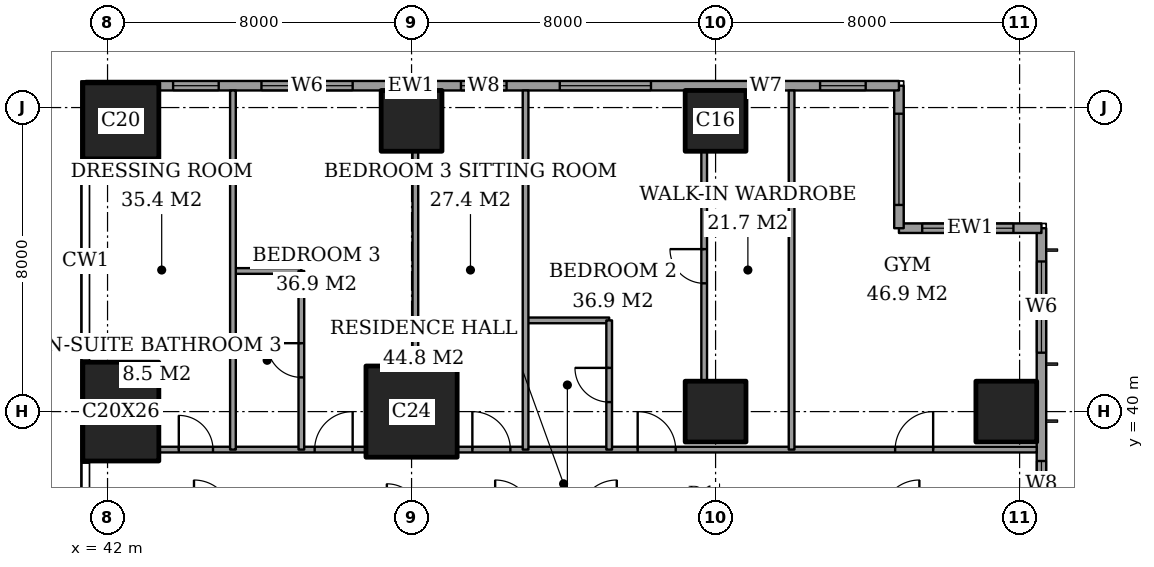
"""IFC4 building model, lengths in metres.
Left out: names, types, materials, properties, quantities, classifications, styles, units other than length and angle.
Written with IfcOpenShell. Run it as: python <this file> out.ifc"""

import sys

from ifc_helpers import new_model, si_unit, direction, frame, frame_2d, origin, origin_2d, place, context, subcontext, project, spatial, rectangle, extrude, element, fill, save


model = new_model("IFC4")
c1 = context("Model", 3, precision=1e-05, world=origin(), true_north=direction((0.0, 1.0)))
c2 = subcontext(c1, "Body", "Model", "MODEL_VIEW")
j1 = project(units=[si_unit("LENGTHUNIT", "METRE"), si_unit("PLANEANGLEUNIT", "RADIAN")], contexts=[c1])
p1 = place(None, origin())
s1 = spatial("IfcSite", under=j1, at=p1, CompositionType="ELEMENT")
p2 = place(p1, origin())
s2 = spatial("IfcBuilding", under=s1, at=p2, CompositionType="ELEMENT")
p3 = place(p2, frame((0.0, 0.0, 248.4)))
s3 = spatial("IfcBuildingStorey", under=s2, at=p3, CompositionType="ELEMENT", Elevation=248.4)
p4 = place(p3, frame((42.35, 40.0, 0.0), z_axis=(0.0, 0.0, 1.0), x_axis=(1.0, 0.0, 0.0)))
e1 = element("IfcColumn", 1, at=p4, inside=s3, PredefinedType="COLUMN", context=c2, shape_type="SweptSolid", body=[
    extrude(rectangle(XDim=2.0, YDim=2.6, at=origin_2d()), origin(), (0.0, 0.0, 1.0), 3.6),
])
p5 = place(p3, frame((42.35, 47.65, 0.0), z_axis=(0.0, 0.0, 1.0), x_axis=(1.0, 0.0, 0.0)))
e2 = element("IfcColumn", 2, at=p5, inside=s3, PredefinedType="COLUMN", context=c2, shape_type="SweptSolid", body=[
    extrude(rectangle(XDim=2.0, YDim=2.0, at=origin_2d()), origin(), (0.0, 0.0, 1.0), 3.6),
])
p6 = place(p3, frame((50.0, 40.0, 0.0), z_axis=(0.0, 0.0, 1.0), x_axis=(1.0, 0.0, 0.0)))
e3 = element("IfcColumn", 3, at=p6, inside=s3, PredefinedType="COLUMN", context=c2, shape_type="SweptSolid", body=[
    extrude(rectangle(XDim=2.4, YDim=2.4, at=origin_2d()), origin(), (0.0, 0.0, 1.0), 3.6),
])
for number, where, z_axis, x_axis in (
    (4, (50.0, 47.65, 0.0), (0.0, 0.0, 1.0), (1.0, 0.0, 0.0)),
    (5, (58.0, 40.0, 0.0), (0.0, 0.0, 1.0), (1.0, 0.0, 0.0)),
    (6, (58.0, 47.65, 0.0), (0.0, 0.0, 1.0), (1.0, 0.0, 0.0)),
    (7, (65.65, 40.0, 0.0), (0.0, 0.0, 1.0), (1.0, 0.0, 0.0)),
):
    element("IfcColumn", number, at=place(p3, frame(where, z_axis=z_axis, x_axis=x_axis)), inside=s3, PredefinedType="COLUMN", context=c2, shape_type="SweptSolid", body=[
        extrude(rectangle(XDim=1.6, YDim=1.6, at=origin_2d()), origin(), (0.0, 0.0, 1.0), 3.6),
    ])
p7 = place(p3, frame((66.575, 3.175, 0.0), z_axis=(0.0, 0.0, 1.0), x_axis=(0.0, 1.0, 0.0)))
e8 = element("IfcWall", 8, at=p7, inside=s3, PredefinedType="SOLIDWALL", context=c2, shape_type="SweptSolid", body=[
    extrude(rectangle(XDim=41.65, YDim=0.25, at=frame_2d((20.825, 0.0))), origin(), (0.0, 0.0, 1.0), 3.6),
])
p8 = place(p7, frame((0.875, 0.0, 0.6)))
e9 = element("IfcOpeningElement", 9, at=p8, cuts=e8, PredefinedType="OPENING", context=c2, shape_type="SweptSolid", body=[
    extrude(rectangle(XDim=2.4, YDim=2.0, at=frame_2d((1.2, 1.0))), frame((0.0, 0.135, 0.0), z_axis=(0.0, -1.0, 0.0), x_axis=(1.0, 0.0, 0.0)), (0.0, 0.0, 1.0), 0.27),
])
p9 = place(p7, frame((6.0, 0.0, 0.6)))
e10 = element("IfcOpeningElement", 10, at=p9, cuts=e8, PredefinedType="OPENING", context=c2, shape_type="SweptSolid", body=[
    extrude(rectangle(XDim=1.2, YDim=2.0, at=frame_2d((0.6, 1.0))), frame((0.0, 0.135, 0.0), z_axis=(0.0, -1.0, 0.0), x_axis=(1.0, 0.0, 0.0)), (0.0, 0.0, 1.0), 0.27),
])
p10 = place(p7, frame((8.525, 0.0, 0.6)))
e11 = element("IfcOpeningElement", 11, at=p10, cuts=e8, PredefinedType="OPENING", context=c2, shape_type="SweptSolid", body=[
    extrude(rectangle(XDim=2.4, YDim=2.0, at=frame_2d((1.2, 1.0))), frame((0.0, 0.135, 0.0), z_axis=(0.0, -1.0, 0.0), x_axis=(1.0, 0.0, 0.0)), (0.0, 0.0, 1.0), 0.27),
])
p11 = place(p7, frame((15.725, 0.0, 0.6)))
e12 = element("IfcOpeningElement", 12, at=p11, cuts=e8, PredefinedType="OPENING", context=c2, shape_type="SweptSolid", body=[
    extrude(rectangle(XDim=2.4, YDim=2.0, at=frame_2d((1.2, 1.0))), frame((0.0, 0.135, 0.0), z_axis=(0.0, -1.0, 0.0), x_axis=(1.0, 0.0, 0.0)), (0.0, 0.0, 1.0), 0.27),
])
p12 = place(p7, frame((23.525, 0.0, 0.6)))
e13 = element("IfcOpeningElement", 13, at=p12, cuts=e8, PredefinedType="OPENING", context=c2, shape_type="SweptSolid", body=[
    extrude(rectangle(XDim=2.4, YDim=2.0, at=frame_2d((1.2, 1.0))), frame((0.0, 0.135, 0.0), z_axis=(0.0, -1.0, 0.0), x_axis=(1.0, 0.0, 0.0)), (0.0, 0.0, 1.0), 0.27),
])
p13 = place(p7, frame((30.625, 0.0, 0.6)))
e14 = element("IfcOpeningElement", 14, at=p13, cuts=e8, PredefinedType="OPENING", context=c2, shape_type="SweptSolid", body=[
    extrude(rectangle(XDim=2.4, YDim=2.0, at=frame_2d((1.2, 1.0))), frame((0.0, 0.135, 0.0), z_axis=(0.0, -1.0, 0.0), x_axis=(1.0, 0.0, 0.0)), (0.0, 0.0, 1.0), 0.27),
])
p14 = place(p7, frame((34.325, 0.0, 0.6)))
e15 = element("IfcOpeningElement", 15, at=p14, cuts=e8, PredefinedType="OPENING", context=c2, shape_type="SweptSolid", body=[
    extrude(rectangle(XDim=1.2, YDim=2.0, at=frame_2d((0.6, 1.0))), frame((0.0, 0.135, 0.0), z_axis=(0.0, -1.0, 0.0), x_axis=(1.0, 0.0, 0.0)), (0.0, 0.0, 1.0), 0.27),
])
p15 = place(p7, frame((38.375, 0.0, 0.6)))
e16 = element("IfcOpeningElement", 16, at=p15, cuts=e8, PredefinedType="OPENING", context=c2, shape_type="SweptSolid", body=[
    extrude(rectangle(XDim=2.4, YDim=2.0, at=frame_2d((1.2, 1.0))), frame((0.0, 0.135, 0.0), z_axis=(0.0, -1.0, 0.0), x_axis=(1.0, 0.0, 0.0)), (0.0, 0.0, 1.0), 0.27),
])
p16 = place(p3, frame((66.575, 44.825, 0.0), z_axis=(0.0, 0.0, 1.0), x_axis=(-1.0, 0.0, 0.0)))
e17 = element("IfcWall", 17, at=p16, inside=s3, PredefinedType="SOLIDWALL", context=c2, shape_type="SweptSolid", body=[
    extrude(rectangle(XDim=3.75, YDim=0.25, at=frame_2d((1.875, 0.0))), origin(), (0.0, 0.0, 1.0), 3.6),
])
p17 = place(p16, frame((0.738, 0.0, 0.6)))
e18 = element("IfcOpeningElement", 18, at=p17, cuts=e17, PredefinedType="OPENING", context=c2, shape_type="SweptSolid", body=[
    extrude(rectangle(XDim=2.4, YDim=2.0, at=frame_2d((1.2, 1.0))), frame((0.0, 0.135, 0.0), z_axis=(0.0, -1.0, 0.0), x_axis=(1.0, 0.0, 0.0)), (0.0, 0.0, 1.0), 0.27),
])
p18 = place(p3, frame((62.825, 44.825, 0.0), z_axis=(0.0, 0.0, 1.0), x_axis=(0.0, 1.0, 0.0)))
e19 = element("IfcWall", 19, at=p18, inside=s3, PredefinedType="SOLIDWALL", context=c2, shape_type="SweptSolid", body=[
    extrude(rectangle(XDim=3.75, YDim=0.25, at=frame_2d((1.875, 0.0))), origin(), (0.0, 0.0, 1.0), 3.6),
])
p19 = place(p18, frame((0.613, 0.0, 0.6)))
e20 = element("IfcOpeningElement", 20, at=p19, cuts=e19, PredefinedType="OPENING", context=c2, shape_type="SweptSolid", body=[
    extrude(rectangle(XDim=2.4, YDim=2.0, at=frame_2d((1.2, 1.0))), frame((0.0, 0.135, 0.0), z_axis=(0.0, -1.0, 0.0), x_axis=(1.0, 0.0, 0.0)), (0.0, 0.0, 1.0), 0.27),
])
p20 = place(p3, frame((62.825, 48.575, 0.0), z_axis=(0.0, 0.0, 1.0), x_axis=(-1.0, 0.0, 0.0)))
e21 = element("IfcWall", 21, at=p20, inside=s3, PredefinedType="SOLIDWALL", context=c2, shape_type="SweptSolid", body=[
    extrude(rectangle(XDim=21.4, YDim=0.25, at=frame_2d((10.7, 0.0))), origin(), (0.0, 0.0, 1.0), 3.6),
])
p21 = place(p20, frame((0.875, 0.0, 0.6)))
e22 = element("IfcOpeningElement", 22, at=p21, cuts=e21, PredefinedType="OPENING", context=c2, shape_type="SweptSolid", body=[
    extrude(rectangle(XDim=1.2, YDim=2.0, at=frame_2d((0.6, 1.0))), frame((0.0, 0.135, 0.0), z_axis=(0.0, -1.0, 0.0), x_axis=(1.0, 0.0, 0.0)), (0.0, 0.0, 1.0), 0.27),
])
p22 = place(p20, frame((3.2, 0.0, 0.6)))
e23 = element("IfcOpeningElement", 23, at=p22, cuts=e21, PredefinedType="OPENING", context=c2, shape_type="SweptSolid", body=[
    extrude(rectangle(XDim=0.6, YDim=2.0, at=frame_2d((0.3, 1.0))), frame((0.0, 0.135, 0.0), z_axis=(0.0, -1.0, 0.0), x_axis=(1.0, 0.0, 0.0)), (0.0, 0.0, 1.0), 0.27),
])
p23 = place(p20, frame((6.525, 0.0, 0.6)))
e24 = element("IfcOpeningElement", 24, at=p23, cuts=e21, PredefinedType="OPENING", context=c2, shape_type="SweptSolid", body=[
    extrude(rectangle(XDim=2.4, YDim=2.0, at=frame_2d((1.2, 1.0))), frame((0.0, 0.135, 0.0), z_axis=(0.0, -1.0, 0.0), x_axis=(1.0, 0.0, 0.0)), (0.0, 0.0, 1.0), 0.27),
])
p24 = place(p20, frame((10.325, 0.0, 0.6)))
e25 = element("IfcOpeningElement", 25, at=p24, cuts=e21, PredefinedType="OPENING", context=c2, shape_type="SweptSolid", body=[
    extrude(rectangle(XDim=1.2, YDim=2.0, at=frame_2d((0.6, 1.0))), frame((0.0, 0.135, 0.0), z_axis=(0.0, -1.0, 0.0), x_axis=(1.0, 0.0, 0.0)), (0.0, 0.0, 1.0), 0.27),
])
p25 = place(p20, frame((14.375, 0.0, 0.6)))
e26 = element("IfcOpeningElement", 26, at=p25, cuts=e21, PredefinedType="OPENING", context=c2, shape_type="SweptSolid", body=[
    extrude(rectangle(XDim=2.4, YDim=2.0, at=frame_2d((1.2, 1.0))), frame((0.0, 0.135, 0.0), z_axis=(0.0, -1.0, 0.0), x_axis=(1.0, 0.0, 0.0)), (0.0, 0.0, 1.0), 0.27),
])
p26 = place(p20, frame((17.9, 0.0, 0.6)))
e27 = element("IfcOpeningElement", 27, at=p26, cuts=e21, PredefinedType="OPENING", context=c2, shape_type="SweptSolid", body=[
    extrude(rectangle(XDim=1.2, YDim=2.0, at=frame_2d((0.6, 1.0))), frame((0.0, 0.135, 0.0), z_axis=(0.0, -1.0, 0.0), x_axis=(1.0, 0.0, 0.0)), (0.0, 0.0, 1.0), 0.27),
])
p27 = place(p3, frame((43.35, 39.0, 0.0), z_axis=(0.0, 0.0, 1.0), x_axis=(1.0, 0.0, 0.0)))
e28 = element("IfcWall", 28, at=p27, inside=s3, PredefinedType="PARTITIONING", context=c2, shape_type="SweptSolid", body=[
    extrude(rectangle(XDim=5.45, YDim=0.15, at=frame_2d((2.725, 0.0))), origin(), (0.0, 0.0, 1.0), 3.35),
])
p28 = place(p27, frame((4.1, 0.0, 0.0)))
e29 = element("IfcOpeningElement", 29, at=p28, cuts=e28, PredefinedType="OPENING", context=c2, shape_type="SweptSolid", body=[
    extrude(rectangle(XDim=1.0, YDim=2.1, at=frame_2d((0.5, 1.05))), frame((0.0, 0.085, 0.0), z_axis=(0.0, -1.0, 0.0), x_axis=(1.0, 0.0, 0.0)), (0.0, 0.0, 1.0), 0.17),
])
p29 = place(p27, frame((0.525, 0.0, 0.0)))
e30 = element("IfcOpeningElement", 30, at=p29, cuts=e28, PredefinedType="OPENING", context=c2, shape_type="SweptSolid", body=[
    extrude(rectangle(XDim=0.9, YDim=2.1, at=frame_2d((0.45, 1.05))), frame((0.0, 0.085, 0.0), z_axis=(0.0, -1.0, 0.0), x_axis=(1.0, 0.0, 0.0)), (0.0, 0.0, 1.0), 0.17),
])
p30 = place(p3, frame((51.2, 39.0, 0.0), z_axis=(0.0, 0.0, 1.0), x_axis=(1.0, 0.0, 0.0)))
e31 = element("IfcWall", 31, at=p30, inside=s3, PredefinedType="PARTITIONING", context=c2, shape_type="SweptSolid", body=[
    extrude(rectangle(XDim=15.25, YDim=0.15, at=frame_2d((7.625, 0.0))), origin(), (0.0, 0.0, 1.0), 3.35),
])
p31 = place(p30, frame((11.525, 0.0, 0.0)))
e32 = element("IfcOpeningElement", 32, at=p31, cuts=e31, PredefinedType="OPENING", context=c2, shape_type="SweptSolid", body=[
    extrude(rectangle(XDim=1.0, YDim=2.1, at=frame_2d((0.5, 1.05))), frame((0.0, 0.085, 0.0), z_axis=(0.0, -1.0, 0.0), x_axis=(1.0, 0.0, 0.0)), (0.0, 0.0, 1.0), 0.17),
])
p32 = place(p30, frame((4.75, 0.0, 0.0)))
e33 = element("IfcOpeningElement", 33, at=p32, cuts=e31, PredefinedType="OPENING", context=c2, shape_type="SweptSolid", body=[
    extrude(rectangle(XDim=1.0, YDim=2.1, at=frame_2d((0.5, 1.05))), frame((0.0, 0.085, 0.0), z_axis=(0.0, -1.0, 0.0), x_axis=(1.0, 0.0, 0.0)), (0.0, 0.0, 1.0), 0.17),
])
p33 = place(p30, frame((0.4, 0.0, 0.0)))
e34 = element("IfcOpeningElement", 34, at=p33, cuts=e31, PredefinedType="OPENING", context=c2, shape_type="SweptSolid", body=[
    extrude(rectangle(XDim=1.0, YDim=2.1, at=frame_2d((0.5, 1.05))), frame((0.0, 0.085, 0.0), z_axis=(0.0, -1.0, 0.0), x_axis=(1.0, 0.0, 0.0)), (0.0, 0.0, 1.0), 0.17),
])
p34 = place(p3, frame((53.0, 42.4, 0.0), z_axis=(0.0, 0.0, 1.0), x_axis=(1.0, 0.0, 0.0)))
e35 = element("IfcWall", 35, at=p34, inside=s3, PredefinedType="PARTITIONING", context=c2, shape_type="SweptSolid", body=[
    extrude(rectangle(XDim=2.2, YDim=0.15, at=frame_2d((1.1, 0.0))), origin(), (0.0, 0.0, 1.0), 3.35),
])
p35 = place(p3, frame((45.3, 43.7, 0.0), z_axis=(0.0, 0.0, 1.0), x_axis=(1.0, 0.0, 0.0)))
e36 = element("IfcWall", 36, at=p35, inside=s3, PredefinedType="PARTITIONING", context=c2, shape_type="SweptSolid", body=[
    extrude(rectangle(XDim=1.8, YDim=0.15, at=frame_2d((0.9, 0.0))), origin(), (0.0, 0.0, 1.0), 3.35),
])
p36 = place(p3, frame((45.3, 39.0, 0.0), z_axis=(0.0, 0.0, 1.0), x_axis=(0.0, 1.0, 0.0)))
e37 = element("IfcWall", 37, at=p36, inside=s3, PredefinedType="PARTITIONING", context=c2, shape_type="SweptSolid", body=[
    extrude(rectangle(XDim=9.45, YDim=0.15, at=frame_2d((4.725, 0.0))), origin(), (0.0, 0.0, 1.0), 3.35),
])
p37 = place(p3, frame((47.1, 39.0, 0.0), z_axis=(0.0, 0.0, 1.0), x_axis=(0.0, 1.0, 0.0)))
e38 = element("IfcWall", 38, at=p37, inside=s3, PredefinedType="PARTITIONING", context=c2, shape_type="SweptSolid", body=[
    extrude(rectangle(XDim=4.7, YDim=0.15, at=frame_2d((2.35, 0.0))), origin(), (0.0, 0.0, 1.0), 3.35),
])
p38 = place(p37, frame((1.9, 0.0, 0.0)))
e39 = element("IfcOpeningElement", 39, at=p38, cuts=e38, PredefinedType="OPENING", context=c2, shape_type="SweptSolid", body=[
    extrude(rectangle(XDim=0.9, YDim=2.1, at=frame_2d((0.45, 1.05))), frame((0.0, 0.085, 0.0), z_axis=(0.0, -1.0, 0.0), x_axis=(1.0, 0.0, 0.0)), (0.0, 0.0, 1.0), 0.17),
])
p39 = place(p3, frame((50.1, 41.2, 0.0), z_axis=(0.0, 0.0, 1.0), x_axis=(0.0, 1.0, 0.0)))
e40 = element("IfcWall", 40, at=p39, inside=s3, PredefinedType="PARTITIONING", context=c2, shape_type="SweptSolid", body=[
    extrude(rectangle(XDim=5.65, YDim=0.15, at=frame_2d((2.825, 0.0))), origin(), (0.0, 0.0, 1.0), 3.35),
])
p40 = place(p3, frame((53.0, 39.0, 0.0), z_axis=(0.0, 0.0, 1.0), x_axis=(0.0, 1.0, 0.0)))
e41 = element("IfcWall", 41, at=p40, inside=s3, PredefinedType="PARTITIONING", context=c2, shape_type="SweptSolid", body=[
    extrude(rectangle(XDim=9.45, YDim=0.15, at=frame_2d((4.725, 0.0))), origin(), (0.0, 0.0, 1.0), 3.35),
])
p41 = place(p3, frame((55.2, 39.0, 0.0), z_axis=(0.0, 0.0, 1.0), x_axis=(0.0, 1.0, 0.0)))
e42 = element("IfcWall", 42, at=p41, inside=s3, PredefinedType="PARTITIONING", context=c2, shape_type="SweptSolid", body=[
    extrude(rectangle(XDim=3.4, YDim=0.15, at=frame_2d((1.7, 0.0))), origin(), (0.0, 0.0, 1.0), 3.35),
])
p42 = place(p41, frame((1.25, 0.0, 0.0)))
e43 = element("IfcOpeningElement", 43, at=p42, cuts=e42, PredefinedType="OPENING", context=c2, shape_type="SweptSolid", body=[
    extrude(rectangle(XDim=0.9, YDim=2.1, at=frame_2d((0.45, 1.05))), frame((0.0, 0.085, 0.0), z_axis=(0.0, -1.0, 0.0), x_axis=(1.0, 0.0, 0.0)), (0.0, 0.0, 1.0), 0.17),
])
p43 = place(p3, frame((57.7, 40.8, 0.0), z_axis=(0.0, 0.0, 1.0), x_axis=(0.0, 1.0, 0.0)))
e44 = element("IfcWall", 44, at=p43, inside=s3, PredefinedType="PARTITIONING", context=c2, shape_type="SweptSolid", body=[
    extrude(rectangle(XDim=6.05, YDim=0.15, at=frame_2d((3.025, 0.0))), origin(), (0.0, 0.0, 1.0), 3.35),
])
p44 = place(p43, frame((2.575, 0.0, 0.0)))
e45 = element("IfcOpeningElement", 45, at=p44, cuts=e44, PredefinedType="OPENING", context=c2, shape_type="SweptSolid", body=[
    extrude(rectangle(XDim=0.9, YDim=2.1, at=frame_2d((0.45, 1.05))), frame((0.0, 0.085, 0.0), z_axis=(0.0, -1.0, 0.0), x_axis=(1.0, 0.0, 0.0)), (0.0, 0.0, 1.0), 0.17),
])
p45 = place(p3, frame((60.0, 39.0, 0.0), z_axis=(0.0, 0.0, 1.0), x_axis=(0.0, 1.0, 0.0)))
e46 = element("IfcWall", 46, at=p45, inside=s3, PredefinedType="PARTITIONING", context=c2, shape_type="SweptSolid", body=[
    extrude(rectangle(XDim=9.45, YDim=0.15, at=frame_2d((4.725, 0.0))), origin(), (0.0, 0.0, 1.0), 3.35),
])
p46 = place(p14, origin())
e47 = element("IfcWindow", 47, at=p46, inside=s3, PartitioningType="SINGLE_PANEL", PredefinedType="WINDOW", context=c2, shape_type="SweptSolid", body=[
    extrude(rectangle(XDim=1.2, YDim=2.0, at=frame_2d((0.6, 1.0))), frame((0.0, 0.03, 0.0), z_axis=(0.0, -1.0, 0.0), x_axis=(1.0, 0.0, 0.0)), (0.0, 0.0, 1.0), 0.06),
])
fill(e15, e47)
p47 = place(p15, origin())
e48 = element("IfcWindow", 48, at=p47, inside=s3, PartitioningType="SINGLE_PANEL", PredefinedType="WINDOW", context=c2, shape_type="SweptSolid", body=[
    extrude(rectangle(XDim=2.4, YDim=2.0, at=frame_2d((1.2, 1.0))), frame((0.0, 0.03, 0.0), z_axis=(0.0, -1.0, 0.0), x_axis=(1.0, 0.0, 0.0)), (0.0, 0.0, 1.0), 0.06),
])
fill(e16, e48)
p48 = place(p17, origin())
e49 = element("IfcWindow", 49, at=p48, inside=s3, PartitioningType="SINGLE_PANEL", PredefinedType="WINDOW", context=c2, shape_type="SweptSolid", body=[
    extrude(rectangle(XDim=2.4, YDim=2.0, at=frame_2d((1.2, 1.0))), frame((0.0, 0.03, 0.0), z_axis=(0.0, -1.0, 0.0), x_axis=(1.0, 0.0, 0.0)), (0.0, 0.0, 1.0), 0.06),
])
fill(e18, e49)
p49 = place(p19, origin())
e50 = element("IfcWindow", 50, at=p49, inside=s3, PartitioningType="SINGLE_PANEL", PredefinedType="WINDOW", context=c2, shape_type="SweptSolid", body=[
    extrude(rectangle(XDim=2.4, YDim=2.0, at=frame_2d((1.2, 1.0))), frame((0.0, 0.03, 0.0), z_axis=(0.0, -1.0, 0.0), x_axis=(1.0, 0.0, 0.0)), (0.0, 0.0, 1.0), 0.06),
])
fill(e20, e50)
p50 = place(p21, origin())
e51 = element("IfcWindow", 51, at=p50, inside=s3, PartitioningType="SINGLE_PANEL", PredefinedType="WINDOW", context=c2, shape_type="SweptSolid", body=[
    extrude(rectangle(XDim=1.2, YDim=2.0, at=frame_2d((0.6, 1.0))), frame((0.0, 0.03, 0.0), z_axis=(0.0, -1.0, 0.0), x_axis=(1.0, 0.0, 0.0)), (0.0, 0.0, 1.0), 0.06),
])
fill(e22, e51)
p51 = place(p22, origin())
e52 = element("IfcWindow", 52, at=p51, inside=s3, PartitioningType="SINGLE_PANEL", PredefinedType="WINDOW", context=c2, shape_type="SweptSolid", body=[
    extrude(rectangle(XDim=0.6, YDim=2.0, at=frame_2d((0.3, 1.0))), frame((0.0, 0.03, 0.0), z_axis=(0.0, -1.0, 0.0), x_axis=(1.0, 0.0, 0.0)), (0.0, 0.0, 1.0), 0.06),
])
fill(e23, e52)
p52 = place(p23, origin())
e53 = element("IfcWindow", 53, at=p52, inside=s3, PartitioningType="SINGLE_PANEL", PredefinedType="WINDOW", context=c2, shape_type="SweptSolid", body=[
    extrude(rectangle(XDim=2.4, YDim=2.0, at=frame_2d((1.2, 1.0))), frame((0.0, 0.03, 0.0), z_axis=(0.0, -1.0, 0.0), x_axis=(1.0, 0.0, 0.0)), (0.0, 0.0, 1.0), 0.06),
])
fill(e24, e53)
p53 = place(p24, origin())
e54 = element("IfcWindow", 54, at=p53, inside=s3, PartitioningType="SINGLE_PANEL", PredefinedType="WINDOW", context=c2, shape_type="SweptSolid", body=[
    extrude(rectangle(XDim=1.2, YDim=2.0, at=frame_2d((0.6, 1.0))), frame((0.0, 0.03, 0.0), z_axis=(0.0, -1.0, 0.0), x_axis=(1.0, 0.0, 0.0)), (0.0, 0.0, 1.0), 0.06),
])
fill(e25, e54)
p54 = place(p25, origin())
e55 = element("IfcWindow", 55, at=p54, inside=s3, PartitioningType="SINGLE_PANEL", PredefinedType="WINDOW", context=c2, shape_type="SweptSolid", body=[
    extrude(rectangle(XDim=2.4, YDim=2.0, at=frame_2d((1.2, 1.0))), frame((0.0, 0.03, 0.0), z_axis=(0.0, -1.0, 0.0), x_axis=(1.0, 0.0, 0.0)), (0.0, 0.0, 1.0), 0.06),
])
fill(e26, e55)
p55 = place(p26, origin())
e56 = element("IfcWindow", 56, at=p55, inside=s3, PartitioningType="SINGLE_PANEL", PredefinedType="WINDOW", context=c2, shape_type="SweptSolid", body=[
    extrude(rectangle(XDim=1.2, YDim=2.0, at=frame_2d((0.6, 1.0))), frame((0.0, 0.03, 0.0), z_axis=(0.0, -1.0, 0.0), x_axis=(1.0, 0.0, 0.0)), (0.0, 0.0, 1.0), 0.06),
])
fill(e27, e56)
p56 = place(p31, origin())
e57 = element("IfcDoor", 57, at=p56, inside=s3, OperationType="SINGLE_SWING_LEFT", PredefinedType="DOOR", context=c2, shape_type="SweptSolid", body=[
    extrude(rectangle(XDim=1.0, YDim=2.1, at=frame_2d((0.5, 1.05))), frame((0.0, 0.025, 0.0), z_axis=(0.0, -1.0, 0.0), x_axis=(1.0, 0.0, 0.0)), (0.0, 0.0, 1.0), 0.05),
])
fill(e32, e57)
p57 = place(p44, origin())
e58 = element("IfcDoor", 58, at=p57, inside=s3, OperationType="SINGLE_SWING_LEFT", PredefinedType="DOOR", context=c2, shape_type="SweptSolid", body=[
    extrude(rectangle(XDim=0.9, YDim=2.1, at=frame_2d((0.45, 1.05))), frame((0.0, 0.025, 0.0), z_axis=(0.0, -1.0, 0.0), x_axis=(1.0, 0.0, 0.0)), (0.0, 0.0, 1.0), 0.05),
])
fill(e45, e58)
p58 = place(p42, origin())
e59 = element("IfcDoor", 59, at=p58, inside=s3, OperationType="SINGLE_SWING_LEFT", PredefinedType="DOOR", context=c2, shape_type="SweptSolid", body=[
    extrude(rectangle(XDim=0.9, YDim=2.1, at=frame_2d((0.45, 1.05))), frame((0.0, 0.025, 0.0), z_axis=(0.0, -1.0, 0.0), x_axis=(1.0, 0.0, 0.0)), (0.0, 0.0, 1.0), 0.05),
])
fill(e43, e59)
p59 = place(p32, origin())
e60 = element("IfcDoor", 60, at=p59, inside=s3, OperationType="SINGLE_SWING_RIGHT", PredefinedType="DOOR", context=c2, shape_type="SweptSolid", body=[
    extrude(rectangle(XDim=1.0, YDim=2.1, at=frame_2d((0.5, 1.05))), frame((0.0, 0.025, 0.0), z_axis=(0.0, -1.0, 0.0), x_axis=(1.0, 0.0, 0.0)), (0.0, 0.0, 1.0), 0.05),
])
fill(e33, e60)
p60 = place(p33, origin())
e61 = element("IfcDoor", 61, at=p60, inside=s3, OperationType="SINGLE_SWING_RIGHT", PredefinedType="DOOR", context=c2, shape_type="SweptSolid", body=[
    extrude(rectangle(XDim=1.0, YDim=2.1, at=frame_2d((0.5, 1.05))), frame((0.0, 0.025, 0.0), z_axis=(0.0, -1.0, 0.0), x_axis=(1.0, 0.0, 0.0)), (0.0, 0.0, 1.0), 0.05),
])
fill(e34, e61)
p61 = place(p38, origin())
e62 = element("IfcDoor", 62, at=p61, inside=s3, OperationType="SINGLE_SWING_LEFT", PredefinedType="DOOR", context=c2, shape_type="SweptSolid", body=[
    extrude(rectangle(XDim=0.9, YDim=2.1, at=frame_2d((0.45, 1.05))), frame((0.0, 0.025, 0.0), z_axis=(0.0, -1.0, 0.0), x_axis=(1.0, 0.0, 0.0)), (0.0, 0.0, 1.0), 0.05),
])
fill(e39, e62)
p62 = place(p28, origin())
e63 = element("IfcDoor", 63, at=p62, inside=s3, OperationType="SINGLE_SWING_LEFT", PredefinedType="DOOR", context=c2, shape_type="SweptSolid", body=[
    extrude(rectangle(XDim=1.0, YDim=2.1, at=frame_2d((0.5, 1.05))), frame((0.0, 0.025, 0.0), z_axis=(0.0, -1.0, 0.0), x_axis=(1.0, 0.0, 0.0)), (0.0, 0.0, 1.0), 0.05),
])
fill(e29, e63)
p63 = place(p29, origin())
e64 = element("IfcDoor", 64, at=p63, inside=s3, OperationType="SINGLE_SWING_RIGHT", PredefinedType="DOOR", context=c2, shape_type="SweptSolid", body=[
    extrude(rectangle(XDim=0.9, YDim=2.1, at=frame_2d((0.45, 1.05))), frame((0.0, 0.025, 0.0), z_axis=(0.0, -1.0, 0.0), x_axis=(1.0, 0.0, 0.0)), (0.0, 0.0, 1.0), 0.05),
])
fill(e30, e64)
save(model, sys.argv[1])
